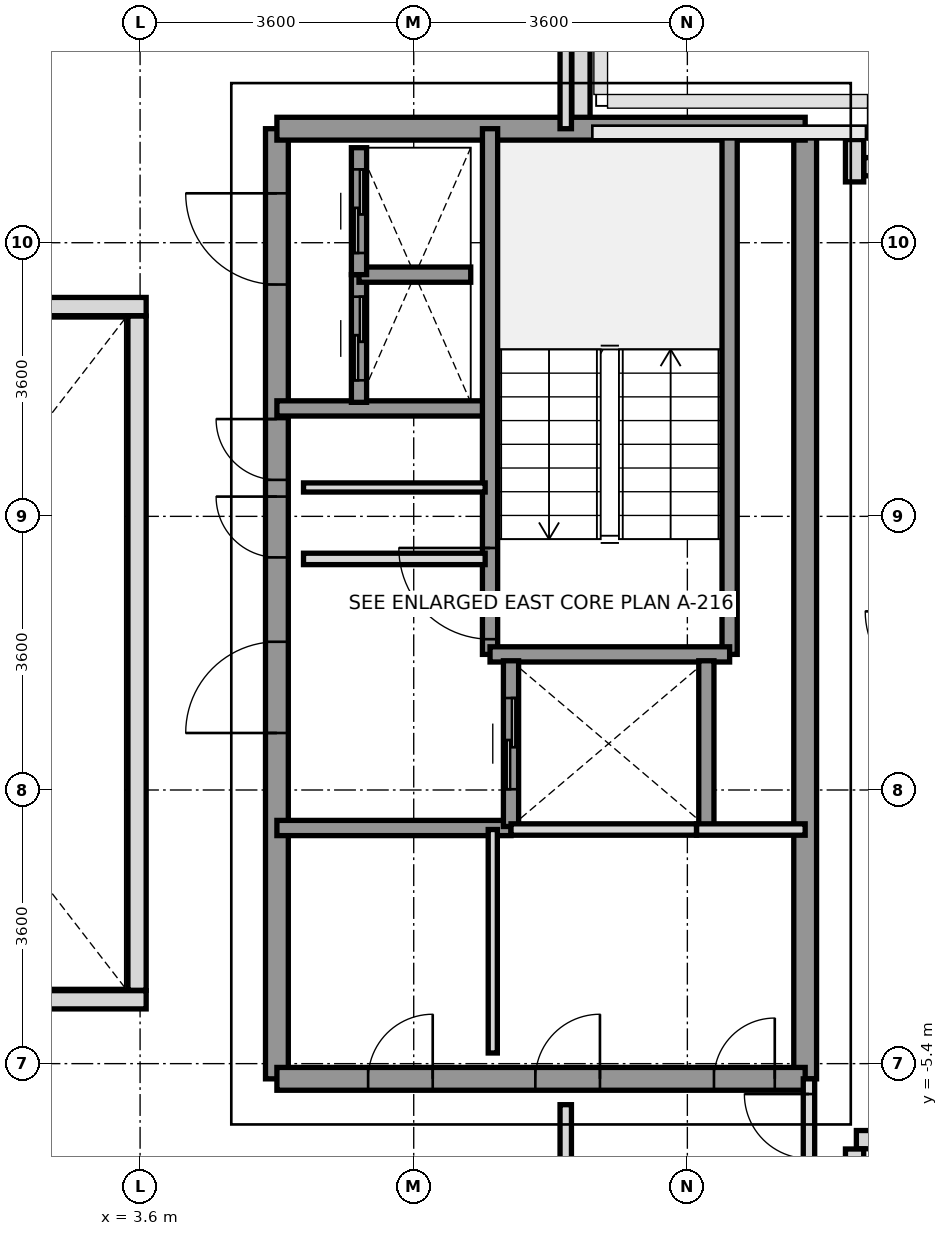
"""IFC4 building model, lengths in metres.
Left out: names, types, materials, properties, quantities, classifications, styles, units other than length and angle.
Written with IfcOpenShell. Run it as: python <this file> out.ifc"""

import sys

from ifc_helpers import new_model, si_unit, direction, frame, frame_2d, origin, place, context, subcontext, project, spatial, rectangle, extrude, source, transform, mapped, element, fill, save


model = new_model("IFC4")
c1 = context("Model", 3, precision=1e-05, world=origin(), true_north=direction((0.0, 1.0)))
c2 = subcontext(c1, "Body", "Model", "MODEL_VIEW")
j1 = project(units=[si_unit("LENGTHUNIT", "METRE"), si_unit("PLANEANGLEUNIT", "RADIAN")], contexts=[c1])
p1 = place(None, origin())
s1 = spatial("IfcSite", under=j1, at=p1, CompositionType="ELEMENT")
p2 = place(p1, origin())
s2 = spatial("IfcBuilding", under=s1, at=p2, CompositionType="ELEMENT")
p3 = place(p2, frame((0.0, 0.0, 258.8)))
s3 = spatial("IfcBuildingStorey", under=s2, at=p3, CompositionType="ELEMENT", Elevation=258.8)
p4 = place(p3, frame((13.6, -6.4, 0.0), z_axis=(0.0, 0.0, 1.0), x_axis=(-1.0, 0.0, 0.0)))
e1 = element("IfcWall", 1, at=p4, inside=s3, PredefinedType="PARAPET", context=c2, shape_type="SweptSolid", body=[
    extrude(rectangle(XDim=0.576, YDim=0.24, at=frame_2d((0.288, 0.0))), origin(), (0.0, 0.0, 1.0), 1.15),
])
p5 = place(p3, frame((13.0, -6.523, 0.0), z_axis=(0.0, 0.0, 1.0), x_axis=(0.0, -1.0, 0.0)))
e2 = element("IfcWall", 2, at=p5, inside=s3, PredefinedType="PARAPET", context=c2, shape_type="SweptSolid", body=[
    extrude(rectangle(XDim=0.234, YDim=0.24, at=frame_2d((0.117, 0.0))), origin(), (0.0, 0.0, 1.0), 1.15),
])
p6 = place(p3, frame((9.4, 8.622, 0.0), z_axis=(0.0, 0.0, 1.0), x_axis=(0.0, -1.0, 0.0)))
e3 = element("IfcWall", 3, at=p6, inside=s3, PredefinedType="PARAPET", context=c2, shape_type="SweptSolid", body=[
    extrude(rectangle(XDim=1.669, YDim=0.24, at=frame_2d((0.834, 0.0))), origin(), (0.0, 0.0, 1.0), 1.15),
])
p7 = place(p3, frame((13.0, 6.757, 0.0), z_axis=(0.0, 0.0, 1.0), x_axis=(0.0, -1.0, 0.0)))
e4 = element("IfcWall", 4, at=p7, inside=s3, PredefinedType="PARAPET", context=c2, shape_type="SweptSolid", body=[
    extrude(rectangle(XDim=0.557, YDim=0.24, at=frame_2d((0.279, 0.0))), origin(), (0.0, 0.0, 1.0), 1.15),
])
p8 = place(p3, frame((13.123, 6.4, 0.0), z_axis=(0.0, 0.0, 1.0), x_axis=(1.0, 0.0, 0.0)))
e5 = element("IfcWall", 5, at=p8, inside=s3, PredefinedType="PARAPET", context=c2, shape_type="SweptSolid", body=[
    extrude(rectangle(XDim=0.477, YDim=0.24, at=frame_2d((0.239, 0.0))), origin(), (0.0, 0.0, 1.0), 1.15),
])
p9 = place(p3, frame((12.35, -5.6, 0.0), z_axis=(0.0, 0.0, 1.0), x_axis=(0.0, 1.0, 0.0)))
e6 = element("IfcWall", 6, at=p9, inside=s3, PredefinedType="SHEAR", context=c2, shape_type="SweptSolid", body=[
    extrude(rectangle(XDim=12.5, YDim=0.3, at=frame_2d((6.25, 0.0))), origin(), (0.0, 0.0, 1.0), 3.01),
])
p10 = place(p3, frame((5.4, -5.6, 0.0), z_axis=(0.0, 0.0, 1.0), x_axis=(0.0, 1.0, 0.0)))
e7 = element("IfcWall", 7, at=p10, inside=s3, PredefinedType="SHEAR", context=c2, shape_type="SweptSolid", body=[
    extrude(rectangle(XDim=12.5, YDim=0.3, at=frame_2d((6.25, 0.0))), origin(), (0.0, 0.0, 1.0), 3.01),
])
p11 = place(p10, frame((4.55, 0.0, 0.0)))
e8 = element("IfcOpeningElement", 8, at=p11, cuts=e7, PredefinedType="OPENING", context=c2, shape_type="SweptSolid", body=[
    extrude(rectangle(XDim=1.2, YDim=2.2, at=frame_2d((0.6, 1.1))), frame((0.0, 0.16, 0.0), z_axis=(0.0, -1.0, 0.0), x_axis=(1.0, 0.0, 0.0)), (0.0, 0.0, 1.0), 0.32),
])
p12 = place(p10, frame((10.45, 0.0, 0.0)))
e9 = element("IfcOpeningElement", 9, at=p12, cuts=e7, PredefinedType="OPENING", context=c2, shape_type="SweptSolid", body=[
    extrude(rectangle(XDim=1.2, YDim=2.2, at=frame_2d((0.6, 1.1))), frame((0.0, 0.16, 0.0), z_axis=(0.0, -1.0, 0.0), x_axis=(1.0, 0.0, 0.0)), (0.0, 0.0, 1.0), 0.32),
])
p13 = place(p10, frame((6.86, 0.0, 0.0)))
e10 = element("IfcOpeningElement", 10, at=p13, cuts=e7, PredefinedType="OPENING", context=c2, shape_type="SweptSolid", body=[
    extrude(rectangle(XDim=0.8, YDim=2.1, at=frame_2d((0.4, 1.05))), frame((0.0, 0.16, 0.0), z_axis=(0.0, -1.0, 0.0), x_axis=(1.0, 0.0, 0.0)), (0.0, 0.0, 1.0), 0.32),
])
p14 = place(p10, frame((7.88, 0.0, 0.0)))
e11 = element("IfcOpeningElement", 11, at=p14, cuts=e7, PredefinedType="OPENING", context=c2, shape_type="SweptSolid", body=[
    extrude(rectangle(XDim=0.8, YDim=2.1, at=frame_2d((0.4, 1.05))), frame((0.0, 0.16, 0.0), z_axis=(0.0, -1.0, 0.0), x_axis=(1.0, 0.0, 0.0)), (0.0, 0.0, 1.0), 0.32),
])
p15 = place(p3, frame((5.4, 6.9, 0.0), z_axis=(0.0, 0.0, 1.0), x_axis=(1.0, 0.0, 0.0)))
e12 = element("IfcWall", 12, at=p15, inside=s3, PredefinedType="SHEAR", context=c2, shape_type="SweptSolid", body=[
    extrude(rectangle(XDim=6.95, YDim=0.3, at=frame_2d((3.475, 0.0))), origin(), (0.0, 0.0, 1.0), 3.01),
])
p16 = place(p3, frame((5.4, -5.6, 0.0), z_axis=(0.0, 0.0, 1.0), x_axis=(1.0, 0.0, 0.0)))
e13 = element("IfcWall", 13, at=p16, inside=s3, PredefinedType="SHEAR", context=c2, shape_type="SweptSolid", body=[
    extrude(rectangle(XDim=6.95, YDim=0.3, at=frame_2d((3.475, 0.0))), origin(), (0.0, 0.0, 1.0), 3.01),
])
p17 = place(p16, frame((5.75, 0.0, 0.0)))
e14 = element("IfcOpeningElement", 14, at=p17, cuts=e13, PredefinedType="OPENING", context=c2, shape_type="SweptSolid", body=[
    extrude(rectangle(XDim=0.8, YDim=2.1, at=frame_2d((0.4, 1.05))), frame((0.0, 0.16, 0.0), z_axis=(0.0, -1.0, 0.0), x_axis=(1.0, 0.0, 0.0)), (0.0, 0.0, 1.0), 0.32),
])
p18 = place(p16, frame((1.2, 0.0, 0.0)))
e15 = element("IfcOpeningElement", 15, at=p18, cuts=e13, PredefinedType="OPENING", context=c2, shape_type="SweptSolid", body=[
    extrude(rectangle(XDim=0.85, YDim=2.1, at=frame_2d((0.425, 1.05))), frame((0.0, 0.16, 0.0), z_axis=(0.0, -1.0, 0.0), x_axis=(1.0, 0.0, 0.0)), (0.0, 0.0, 1.0), 0.32),
])
p19 = place(p16, frame((3.4, 0.0, 0.0)))
e16 = element("IfcOpeningElement", 16, at=p19, cuts=e13, PredefinedType="OPENING", context=c2, shape_type="SweptSolid", body=[
    extrude(rectangle(XDim=0.85, YDim=2.1, at=frame_2d((0.425, 1.05))), frame((0.0, 0.16, 0.0), z_axis=(0.0, -1.0, 0.0), x_axis=(1.0, 0.0, 0.0)), (0.0, 0.0, 1.0), 0.32),
])
p20 = place(p3, frame((5.4, 3.22, 0.0), z_axis=(0.0, 0.0, 1.0), x_axis=(1.0, 0.0, 0.0)))
e17 = element("IfcWall", 17, at=p20, inside=s3, PredefinedType="SOLIDWALL", context=c2, shape_type="SweptSolid", body=[
    extrude(rectangle(XDim=2.78, YDim=0.2, at=frame_2d((1.39, 0.0))), origin(), (0.0, 0.0, 1.0), 3.01),
])
p21 = place(p3, frame((5.4, -2.3, 0.0), z_axis=(0.0, 0.0, 1.0), x_axis=(1.0, 0.0, 0.0)))
e18 = element("IfcWall", 18, at=p21, inside=s3, PredefinedType="SOLIDWALL", context=c2, shape_type="SweptSolid", body=[
    extrude(rectangle(XDim=3.08, YDim=0.2, at=frame_2d((1.54, 0.0))), origin(), (0.0, 0.0, 1.0), 3.01),
])
p22 = place(p3, frame((8.204, -0.016, 0.0), z_axis=(0.0, 0.0, 1.0), x_axis=(0.0, 1.0, 0.0)))
e19 = element("IfcWall", 19, at=p22, inside=s3, PredefinedType="SOLIDWALL", context=c2, shape_type="SweptSolid", body=[
    extrude(rectangle(XDim=6.916, YDim=0.2, at=frame_2d((3.458, 0.0))), origin(), (0.0, 0.0, 1.0), 3.01),
])
p23 = place(p22, frame((0.2, 0.0, 0.0)))
e20 = element("IfcOpeningElement", 20, at=p23, cuts=e19, PredefinedType="OPENING", context=c2, shape_type="SweptSolid", body=[
    extrude(rectangle(XDim=1.2, YDim=2.2, at=frame_2d((0.6, 1.1))), frame((0.0, 0.11, 0.0), z_axis=(0.0, -1.0, 0.0), x_axis=(1.0, 0.0, 0.0)), (0.0, 0.0, 1.0), 0.22),
])
p24 = place(p3, frame((11.356, -0.016, 0.0), z_axis=(0.0, 0.0, 1.0), x_axis=(0.0, 1.0, 0.0)))
e21 = element("IfcWall", 21, at=p24, inside=s3, PredefinedType="SOLIDWALL", context=c2, shape_type="SweptSolid", body=[
    extrude(rectangle(XDim=6.916, YDim=0.2, at=frame_2d((3.458, 0.0))), origin(), (0.0, 0.0, 1.0), 3.01),
])
p25 = place(p3, frame((8.204, -0.016, 0.0), z_axis=(0.0, 0.0, 1.0), x_axis=(1.0, 0.0, 0.0)))
e22 = element("IfcWall", 22, at=p25, inside=s3, PredefinedType="SOLIDWALL", context=c2, shape_type="SweptSolid", body=[
    extrude(rectangle(XDim=3.152, YDim=0.2, at=frame_2d((1.576, 0.0))), origin(), (0.0, 0.0, 1.0), 3.01),
])
p26 = place(p3, frame((8.48, -2.28, 0.0), z_axis=(0.0, 0.0, 1.0), x_axis=(0.0, 1.0, 0.0)))
e23 = element("IfcWall", 23, at=p26, inside=s3, PredefinedType="SOLIDWALL", context=c2, shape_type="SweptSolid", body=[
    extrude(rectangle(XDim=2.18, YDim=0.2, at=frame_2d((1.09, 0.0))), origin(), (0.0, 0.0, 1.0), 3.01),
])
p27 = place(p26, frame((0.49, 0.0, 0.0)))
e24 = element("IfcOpeningElement", 24, at=p27, cuts=e23, PredefinedType="OPENING", context=c2, shape_type="SweptSolid", body=[
    extrude(rectangle(XDim=1.2, YDim=2.2, at=frame_2d((0.6, 1.1))), frame((0.0, 0.11, 0.0), z_axis=(0.0, -1.0, 0.0), x_axis=(1.0, 0.0, 0.0)), (0.0, 0.0, 1.0), 0.22),
])
p28 = place(p3, frame((11.05, -2.28, 0.0), z_axis=(0.0, 0.0, 1.0), x_axis=(0.0, 1.0, 0.0)))
e25 = element("IfcWall", 25, at=p28, inside=s3, PredefinedType="SOLIDWALL", context=c2, shape_type="SweptSolid", body=[
    extrude(rectangle(XDim=2.18, YDim=0.2, at=frame_2d((1.09, 0.0))), origin(), (0.0, 0.0, 1.0), 3.01),
])
p29 = place(p3, frame((6.48, 3.3, 0.0), z_axis=(0.0, 0.0, 1.0), x_axis=(0.0, 1.0, 0.0)))
e26 = element("IfcWall", 26, at=p29, inside=s3, PredefinedType="SOLIDWALL", context=c2, shape_type="SweptSolid", body=[
    extrude(rectangle(XDim=1.68, YDim=0.2, at=frame_2d((0.84, 0.0))), origin(), (0.0, 0.0, 1.0), 3.01),
])
p30 = place(p29, frame((0.29, 0.0, 0.0)))
e27 = element("IfcOpeningElement", 27, at=p30, cuts=e26, PredefinedType="OPENING", context=c2, shape_type="SweptSolid", body=[
    extrude(rectangle(XDim=1.1, YDim=2.2, at=frame_2d((0.55, 1.1))), frame((0.0, 0.11, 0.0), z_axis=(0.0, -1.0, 0.0), x_axis=(1.0, 0.0, 0.0)), (0.0, 0.0, 1.0), 0.22),
])
p31 = place(p3, frame((6.48, 4.98, 0.0), z_axis=(0.0, 0.0, 1.0), x_axis=(1.0, 0.0, 0.0)))
e28 = element("IfcWall", 28, at=p31, inside=s3, PredefinedType="SOLIDWALL", context=c2, shape_type="SweptSolid", body=[
    extrude(rectangle(XDim=1.47, YDim=0.2, at=frame_2d((0.735, 0.0))), origin(), (0.0, 0.0, 1.0), 3.01),
])
p32 = place(p3, frame((6.48, 4.98, 0.0), z_axis=(0.0, 0.0, 1.0), x_axis=(0.0, 1.0, 0.0)))
e29 = element("IfcWall", 29, at=p32, inside=s3, PredefinedType="SOLIDWALL", context=c2, shape_type="SweptSolid", body=[
    extrude(rectangle(XDim=1.67, YDim=0.2, at=frame_2d((0.835, 0.0))), origin(), (0.0, 0.0, 1.0), 3.01),
])
p33 = place(p32, frame((0.285, 0.0, 0.0)))
e30 = element("IfcOpeningElement", 30, at=p33, cuts=e29, PredefinedType="OPENING", context=c2, shape_type="SweptSolid", body=[
    extrude(rectangle(XDim=1.1, YDim=2.2, at=frame_2d((0.55, 1.1))), frame((0.0, 0.11, 0.0), z_axis=(0.0, -1.0, 0.0), x_axis=(1.0, 0.0, 0.0)), (0.0, 0.0, 1.0), 0.22),
])
p34 = place(p3, frame((5.75, 1.24, 0.0), z_axis=(0.0, 0.0, 1.0), x_axis=(1.0, 0.0, 0.0)))
e31 = element("IfcWall", 31, at=p34, inside=s3, PredefinedType="PARTITIONING", context=c2, shape_type="SweptSolid", body=[
    extrude(rectangle(XDim=2.39, YDim=0.15, at=frame_2d((1.195, 0.0))), origin(), (0.0, 0.0, 1.0), 3.01),
])
p35 = place(p3, frame((5.75, 2.18, 0.0), z_axis=(0.0, 0.0, 1.0), x_axis=(1.0, 0.0, 0.0)))
e32 = element("IfcWall", 32, at=p35, inside=s3, PredefinedType="PARTITIONING", context=c2, shape_type="SweptSolid", body=[
    extrude(rectangle(XDim=2.39, YDim=0.12, at=frame_2d((1.195, 0.0))), origin(), (0.0, 0.0, 1.0), 3.01),
])
p36 = place(p3, frame((10.92, -2.32, 0.0), z_axis=(0.0, 0.0, 1.0), x_axis=(1.0, 0.0, 0.0)))
e33 = element("IfcWall", 33, at=p36, inside=s3, PredefinedType="PARTITIONING", context=c2, shape_type="SweptSolid", body=[
    extrude(rectangle(XDim=1.43, YDim=0.15, at=frame_2d((0.715, 0.0))), origin(), (0.0, 0.0, 1.0), 3.01),
])
p37 = place(p3, frame((8.24, -5.26, 0.0), z_axis=(0.0, 0.0, 1.0), x_axis=(0.0, 1.0, 0.0)))
e34 = element("IfcWall", 34, at=p37, inside=s3, PredefinedType="PARTITIONING", context=c2, shape_type="SweptSolid", body=[
    extrude(rectangle(XDim=2.94, YDim=0.12, at=frame_2d((1.47, 0.0))), origin(), (0.0, 0.0, 1.0), 3.01),
])
p38 = place(p3, frame((8.48, -2.32, 0.0), z_axis=(0.0, 0.0, 1.0), x_axis=(1.0, 0.0, 0.0)))
e35 = element("IfcWall", 35, at=p38, inside=s3, PredefinedType="PARTITIONING", context=c2, shape_type="SweptSolid", body=[
    extrude(rectangle(XDim=2.44, YDim=0.15, at=frame_2d((1.22, 0.0))), origin(), (0.0, 0.0, 1.0), 3.01),
])
p39 = place(p3, frame((9.2, 6.9, 0.0), z_axis=(0.0, 0.0, 1.0), x_axis=(0.0, 1.0, 0.0)))
e36 = element("IfcWall", 36, at=p39, inside=s3, PredefinedType="PARTITIONING", context=c2, shape_type="SweptSolid", body=[
    extrude(rectangle(XDim=3.38, YDim=0.15, at=frame_2d((1.69, 0.0))), origin(), (0.0, 0.0, 1.0), 2.61),
])
p40 = place(p3, frame((9.2, -10.28, 0.0), z_axis=(0.0, 0.0, 1.0), x_axis=(0.0, 1.0, 0.0)))
e37 = element("IfcWall", 37, at=p40, inside=s3, PredefinedType="PARTITIONING", context=c2, shape_type="SweptSolid", body=[
    extrude(rectangle(XDim=4.34, YDim=0.15, at=frame_2d((2.17, 0.0))), origin(), (0.0, 0.0, 1.0), 2.61),
])
p41 = place(p3, frame((12.4, -6.85, 0.0), z_axis=(0.0, 0.0, 1.0), x_axis=(0.0, 1.0, 0.0)))
e38 = element("IfcWall", 38, at=p41, inside=s3, PredefinedType="PARTITIONING", context=c2, shape_type="SweptSolid", body=[
    extrude(rectangle(XDim=1.25, YDim=0.15, at=frame_2d((0.625, 0.0))), origin(), (0.0, 0.0, 1.0), 3.01),
])
p42 = place(p41, frame((0.2, 0.0, 0.0)))
e39 = element("IfcOpeningElement", 39, at=p42, cuts=e38, PredefinedType="OPENING", context=c2, shape_type="SweptSolid", body=[
    extrude(rectangle(XDim=0.85, YDim=2.1, at=frame_2d((0.425, 1.05))), frame((0.0, 0.085, 0.0), z_axis=(0.0, -1.0, 0.0), x_axis=(1.0, 0.0, 0.0)), (0.0, 0.0, 1.0), 0.17),
])
for number, where, z_axis, x_axis in (
    (40, (-3.68, -4.56, 0.0), (0.0, 0.0, 1.0), (1.0, 0.0, 0.0)),
    (41, (-3.68, 4.56, 0.0), (0.0, 0.0, 1.0), (1.0, 0.0, 0.0)),
):
    element("IfcWall", number, at=place(p3, frame(where, z_axis=z_axis, x_axis=x_axis)), inside=s3, PredefinedType="PARAPET", context=c2, shape_type="SweptSolid", body=[
        extrude(rectangle(XDim=7.36, YDim=0.24, at=frame_2d((3.68, 0.0))), origin(), (0.0, 0.0, 1.0), 1.15),
    ])
p43 = place(p3, frame((3.56, -4.435, 0.0), z_axis=(0.0, 0.0, 1.0), x_axis=(0.0, 1.0, 0.0)))
e42 = element("IfcWall", 42, at=p43, inside=s3, PredefinedType="PARAPET", context=c2, shape_type="SweptSolid", body=[
    extrude(rectangle(XDim=8.87, YDim=0.24, at=frame_2d((4.435, 0.0))), origin(), (0.0, 0.0, 1.0), 1.15),
])
m1 = source(origin(), c2, "Body", "SweptSolid", [
    extrude(rectangle(XDim=1.2, YDim=2.2, at=frame_2d((0.6, 1.1))), frame((0.0, 0.025, 0.0), z_axis=(0.0, -1.0, 0.0), x_axis=(1.0, 0.0, 0.0)), (0.0, 0.0, 1.0), 0.05),
])
p44 = place(p23, origin())
e43 = element("IfcDoor", 43, at=p44, inside=s3, OperationType="SINGLE_SWING_RIGHT", PredefinedType="DOOR", context=c2, shape_type="MappedRepresentation", body=[
    mapped(m1, transform((0.0, 0.0, 0.0), x_axis=(1.0, 0.0, 0.0), y_axis=(0.0, 1.0, 0.0), z_axis=(0.0, 0.0, 1.0), scale=1.0)),
])
fill(e20, e43)
p45 = place(p11, origin())
e44 = element("IfcDoor", 44, at=p45, inside=s3, OperationType="SINGLE_SWING_LEFT", PredefinedType="DOOR", context=c2, shape_type="MappedRepresentation", body=[
    mapped(m1, transform((0.0, 0.0, 0.0), x_axis=(1.0, 0.0, 0.0), y_axis=(0.0, 1.0, 0.0), z_axis=(0.0, 0.0, 1.0), scale=1.0)),
])
fill(e8, e44)
p46 = place(p12, origin())
e45 = element("IfcDoor", 45, at=p46, inside=s3, OperationType="SINGLE_SWING_RIGHT", PredefinedType="DOOR", context=c2, shape_type="MappedRepresentation", body=[
    mapped(m1, transform((0.0, 0.0, 0.0), x_axis=(1.0, 0.0, 0.0), y_axis=(0.0, 1.0, 0.0), z_axis=(0.0, 0.0, 1.0), scale=1.0)),
])
fill(e9, e45)
m2 = source(origin(), c2, "Body", "SweptSolid", [
    extrude(rectangle(XDim=0.8, YDim=2.1, at=frame_2d((0.4, 1.05))), frame((0.0, 0.025, 0.0), z_axis=(0.0, -1.0, 0.0), x_axis=(1.0, 0.0, 0.0)), (0.0, 0.0, 1.0), 0.05),
])
p47 = place(p13, origin())
e46 = element("IfcDoor", 46, at=p47, inside=s3, OperationType="SINGLE_SWING_RIGHT", PredefinedType="DOOR", context=c2, shape_type="MappedRepresentation", body=[
    mapped(m2, transform((0.0, 0.0, 0.0), x_axis=(1.0, 0.0, 0.0), y_axis=(0.0, 1.0, 0.0), z_axis=(0.0, 0.0, 1.0), scale=1.0)),
])
fill(e10, e46)
p48 = place(p14, origin())
e47 = element("IfcDoor", 47, at=p48, inside=s3, OperationType="SINGLE_SWING_RIGHT", PredefinedType="DOOR", context=c2, shape_type="MappedRepresentation", body=[
    mapped(m2, transform((0.0, 0.0, 0.0), x_axis=(1.0, 0.0, 0.0), y_axis=(0.0, 1.0, 0.0), z_axis=(0.0, 0.0, 1.0), scale=1.0)),
])
fill(e11, e47)
p49 = place(p17, origin())
e48 = element("IfcDoor", 48, at=p49, inside=s3, OperationType="SINGLE_SWING_RIGHT", PredefinedType="DOOR", context=c2, shape_type="MappedRepresentation", body=[
    mapped(m2, transform((0.0, 0.0, 0.0), x_axis=(1.0, 0.0, 0.0), y_axis=(0.0, 1.0, 0.0), z_axis=(0.0, 0.0, 1.0), scale=1.0)),
])
fill(e14, e48)
m3 = source(origin(), c2, "Body", "SweptSolid", [
    extrude(rectangle(XDim=0.85, YDim=2.1, at=frame_2d((0.425, 1.05))), frame((0.0, 0.025, 0.0), z_axis=(0.0, -1.0, 0.0), x_axis=(1.0, 0.0, 0.0)), (0.0, 0.0, 1.0), 0.05),
])
p50 = place(p18, origin())
e49 = element("IfcDoor", 49, at=p50, inside=s3, OperationType="SINGLE_SWING_RIGHT", PredefinedType="DOOR", context=c2, shape_type="MappedRepresentation", body=[
    mapped(m3, transform((0.0, 0.0, 0.0), x_axis=(1.0, 0.0, 0.0), y_axis=(0.0, 1.0, 0.0), z_axis=(0.0, 0.0, 1.0), scale=1.0)),
])
fill(e15, e49)
p51 = place(p19, origin())
e50 = element("IfcDoor", 50, at=p51, inside=s3, OperationType="SINGLE_SWING_RIGHT", PredefinedType="DOOR", context=c2, shape_type="MappedRepresentation", body=[
    mapped(m3, transform((0.0, 0.0, 0.0), x_axis=(1.0, 0.0, 0.0), y_axis=(0.0, 1.0, 0.0), z_axis=(0.0, 0.0, 1.0), scale=1.0)),
])
fill(e16, e50)
p52 = place(p27, origin())
e51 = element("IfcDoor", 51, at=p52, inside=s3, OperationType="SLIDING_TO_RIGHT", PredefinedType="DOOR", context=c2, shape_type="MappedRepresentation", body=[
    mapped(m1, transform((0.0, 0.0, 0.0), x_axis=(1.0, 0.0, 0.0), y_axis=(0.0, 1.0, 0.0), z_axis=(0.0, 0.0, 1.0), scale=1.0)),
])
fill(e24, e51)
m4 = source(origin(), c2, "Body", "SweptSolid", [
    extrude(rectangle(XDim=1.1, YDim=2.2, at=frame_2d((0.55, 1.1))), frame((0.0, 0.025, 0.0), z_axis=(0.0, -1.0, 0.0), x_axis=(1.0, 0.0, 0.0)), (0.0, 0.0, 1.0), 0.05),
])
p53 = place(p30, origin())
e52 = element("IfcDoor", 52, at=p53, inside=s3, OperationType="SLIDING_TO_LEFT", PredefinedType="DOOR", context=c2, shape_type="MappedRepresentation", body=[
    mapped(m4, transform((0.0, 0.0, 0.0), x_axis=(1.0, 0.0, 0.0), y_axis=(0.0, 1.0, 0.0), z_axis=(0.0, 0.0, 1.0), scale=1.0)),
])
fill(e27, e52)
p54 = place(p33, origin())
e53 = element("IfcDoor", 53, at=p54, inside=s3, OperationType="SLIDING_TO_LEFT", PredefinedType="DOOR", context=c2, shape_type="MappedRepresentation", body=[
    mapped(m4, transform((0.0, 0.0, 0.0), x_axis=(1.0, 0.0, 0.0), y_axis=(0.0, 1.0, 0.0), z_axis=(0.0, 0.0, 1.0), scale=1.0)),
])
fill(e30, e53)
p55 = place(p42, origin())
e54 = element("IfcDoor", 54, at=p55, inside=s3, OperationType="SINGLE_SWING_RIGHT", PredefinedType="DOOR", context=c2, shape_type="MappedRepresentation", body=[
    mapped(m3, transform((0.0, 0.0, 0.0), x_axis=(1.0, 0.0, 0.0), y_axis=(0.0, 1.0, 0.0), z_axis=(0.0, 0.0, 1.0), scale=1.0)),
])
fill(e39, e54)
save(model, sys.argv[1])
